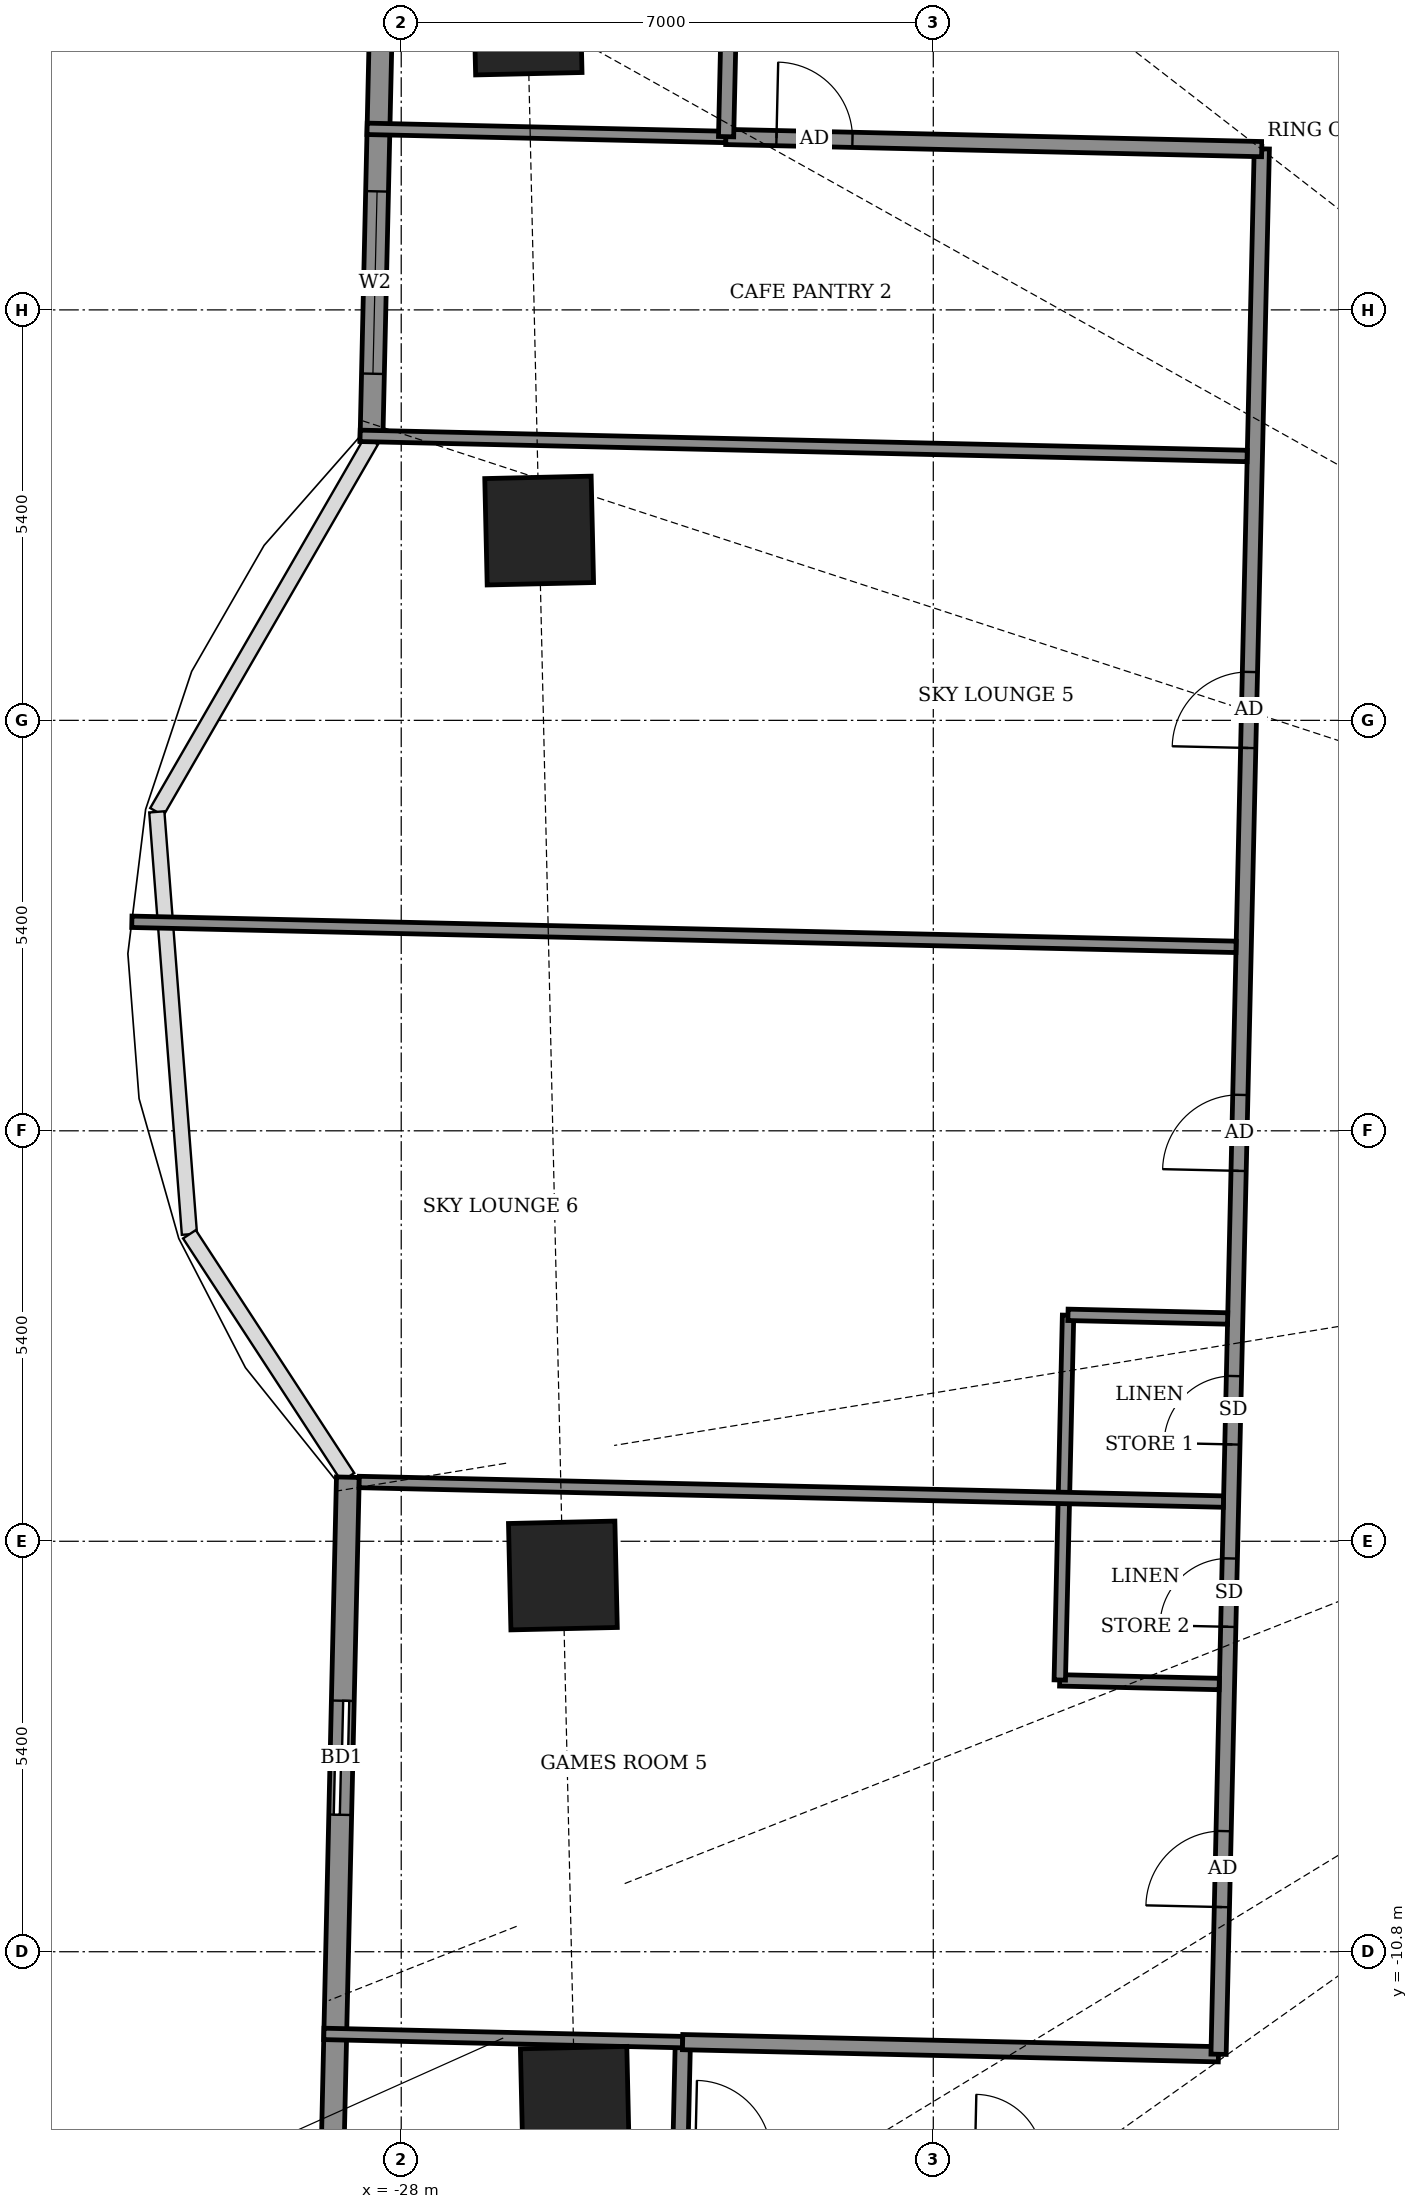
"""IFC4 building model, lengths in metres.
Left out: names, types, materials, properties, quantities, classifications, styles, units other than length and angle.
Written with IfcOpenShell. Run it as: python <this file> out.ifc"""

import sys

from ifc_helpers import new_model, si_unit, direction, frame, frame_2d, origin, origin_2d, place, context, subcontext, project, spatial, rectangle, extrude, element, fill, save


model = new_model("IFC4")
c1 = context("Model", 3, precision=1e-05, world=origin(), true_north=direction((0.0, 1.0)))
c2 = subcontext(c1, "Body", "Model", "MODEL_VIEW")
j1 = project(units=[si_unit("LENGTHUNIT", "METRE"), si_unit("PLANEANGLEUNIT", "RADIAN")], contexts=[c1])
p1 = place(None, origin())
s1 = spatial("IfcSite", under=j1, at=p1, CompositionType="ELEMENT")
p2 = place(p1, origin())
s2 = spatial("IfcBuilding", under=s1, at=p2, CompositionType="ELEMENT")
p3 = place(p2, frame((0.0, 0.0, 97.3)))
s3 = spatial("IfcBuildingStorey", under=s2, at=p3, CompositionType="ELEMENT", Elevation=97.3)
for number, where, z_axis, x_axis in (
    (1, (-25.873, -5.85, -0.55), (0.0, 0.0, 1.0), (0.023, -1.0, 0.0)),
    (2, (-25.716, -12.761, -0.55), (0.0, 0.0, 1.0), (0.023, -1.0, 0.0)),
    (3, (-26.337, 14.607, -0.55), (0.0, 0.0, 1.0), (0.023, -1.0, 0.0)),
    (4, (-26.185, 7.897, -0.55), (0.0, 0.0, 1.0), (0.023, -1.0, 0.0)),
):
    element("IfcColumn", number, at=place(p3, frame(where, z_axis=z_axis, x_axis=x_axis)), inside=s3, PredefinedType="COLUMN", context=c2, shape_type="SweptSolid", body=[
        extrude(rectangle(XDim=1.4, YDim=1.4, at=origin_2d()), origin(), (0.0, 0.0, 1.0), 4.6),
    ])
p4 = place(p3, frame((-28.106, 21.707, 0.0), z_axis=(0.0, 0.0, 1.0), x_axis=(-0.022654663697, -0.999743350172, 0.0)))
e5 = element("IfcWall", 5, at=p4, inside=s3, PredefinedType="SOLIDWALL", context=c2, shape_type="SweptSolid", body=[
    extrude(rectangle(XDim=12.63, YDim=0.3, at=frame_2d((6.315, 0.0))), origin(), (0.0, 0.0, 1.0), 2.55),
])
p5 = place(p4, frame((3.287, 0.0, 0.0)))
e6 = element("IfcOpeningElement", 6, at=p5, cuts=e5, PredefinedType="OPENING", context=c2, shape_type="SweptSolid", body=[
    extrude(rectangle(XDim=1.5, YDim=2.4, at=frame_2d((0.75, 1.2))), frame((0.0, 0.16, 0.0), z_axis=(0.0, -1.0, 0.0), x_axis=(1.0, 0.0, 0.0)), (0.0, 0.0, 1.0), 0.32),
])
p6 = place(p4, frame((9.35, 0.0, 0.9)))
e7 = element("IfcOpeningElement", 7, at=p6, cuts=e5, PredefinedType="OPENING", context=c2, shape_type="SweptSolid", body=[
    extrude(rectangle(XDim=2.4, YDim=1.5, at=frame_2d((1.2, 0.75))), frame((0.0, 0.16, 0.0), z_axis=(0.0, -1.0, 0.0), x_axis=(1.0, 0.0, 0.0)), (0.0, 0.0, 1.0), 0.32),
])
p7 = place(p3, frame((-28.702, -4.557, 0.0), z_axis=(0.0, 0.0, 1.0), x_axis=(-0.022653729471, -0.999743371341, 0.0)))
e8 = element("IfcWall", 8, at=p7, inside=s3, PredefinedType="SOLIDWALL", context=c2, shape_type="SweptSolid", body=[
    extrude(rectangle(XDim=13.03, YDim=0.3, at=frame_2d((6.515, 0.0))), origin(), (0.0, 0.0, 1.0), 2.85),
])
p8 = place(p7, frame((2.942, 0.0, 0.0)))
e9 = element("IfcOpeningElement", 9, at=p8, cuts=e8, PredefinedType="OPENING", context=c2, shape_type="SweptSolid", body=[
    extrude(rectangle(XDim=1.5, YDim=2.4, at=frame_2d((0.75, 1.2))), frame((0.0, 0.16, 0.0), z_axis=(0.0, -1.0, 0.0), x_axis=(1.0, 0.0, 0.0)), (0.0, 0.0, 1.0), 0.32),
])
p9 = place(p7, frame((9.054, 0.0, 0.9)))
e10 = element("IfcOpeningElement", 10, at=p9, cuts=e8, PredefinedType="OPENING", context=c2, shape_type="SweptSolid", body=[
    extrude(rectangle(XDim=2.4, YDim=1.5, at=frame_2d((1.2, 0.75))), frame((0.0, 0.16, 0.0), z_axis=(0.0, -1.0, 0.0), x_axis=(1.0, 0.0, 0.0)), (0.0, 0.0, 1.0), 0.32),
])
p10 = place(p3, frame((-31.765, -17.67, 0.0), z_axis=(0.0, 0.0, 1.0), x_axis=(0.022666865795, 0.999743073592, 0.0)))
e11 = element("IfcWall", 11, at=p10, inside=s3, PredefinedType="USERDEFINED", context=c2, shape_type="SweptSolid", body=[
    extrude(rectangle(XDim=5.999, YDim=0.55, at=frame_2d((3.0, 0.0))), origin(), (0.0, 0.0, 1.0), 0.8),
])
p11 = place(p3, frame((-24.329, -13.488, 0.0), z_axis=(0.0, 0.0, 1.0), x_axis=(0.02279537805, 0.999740151609, 0.0)))
e12 = element("IfcWall", 12, at=p11, inside=s3, PredefinedType="PARTITIONING", context=c2, shape_type="SweptSolid", body=[
    extrude(rectangle(XDim=1.5, YDim=0.2, at=frame_2d((0.75, 0.0))), origin(), (0.0, 0.0, 1.0), 4.05),
])
p12 = place(p3, frame((-29.018, -11.881, 0.0), z_axis=(0.0, 0.0, 1.0), x_axis=(0.999738756298, -0.022856490471, 0.0)))
e13 = element("IfcWall", 13, at=p12, inside=s3, PredefinedType="PARTITIONING", context=c2, shape_type="SweptSolid", body=[
    extrude(rectangle(XDim=4.721, YDim=0.15, at=frame_2d((2.361, 0.0))), origin(), (0.0, 0.0, 1.0), 2.55),
])
p13 = place(p3, frame((-24.298, -11.989, 0.0), z_axis=(0.0, 0.0, 1.0), x_axis=(0.999742853322, -0.022676578901, 0.0)))
e14 = element("IfcWall", 14, at=p13, inside=s3, PredefinedType="PARTITIONING", context=c2, shape_type="SweptSolid", body=[
    extrude(rectangle(XDim=7.052, YDim=0.2, at=frame_2d((3.526, 0.0))), origin(), (0.0, 0.0, 1.0), 2.75),
])
p14 = place(p3, frame((-17.247, -12.149, 0.0), z_axis=(0.0, 0.0, 1.0), x_axis=(0.022696191528, 0.999742408268, 0.0)))
e15 = element("IfcWall", 15, at=p14, inside=s3, PredefinedType="PARTITIONING", context=c2, shape_type="SweptSolid", body=[
    extrude(rectangle(XDim=25.074, YDim=0.2, at=frame_2d((12.537, 0.0))), origin(), (0.0, 0.0, 1.0), 2.55),
])
p15 = place(p14, frame((17.19, 0.0, 0.0)))
e16 = element("IfcOpeningElement", 16, at=p15, cuts=e15, PredefinedType="OPENING", context=c2, shape_type="SweptSolid", body=[
    extrude(rectangle(XDim=1.0, YDim=2.1, at=frame_2d((0.5, 1.05))), frame((0.0, 0.11, 0.0), z_axis=(0.0, -1.0, 0.0), x_axis=(1.0, 0.0, 0.0)), (0.0, 0.0, 1.0), 0.22),
])
p16 = place(p14, frame((11.625, 0.0, 0.0)))
e17 = element("IfcOpeningElement", 17, at=p16, cuts=e15, PredefinedType="OPENING", context=c2, shape_type="SweptSolid", body=[
    extrude(rectangle(XDim=1.0, YDim=2.1, at=frame_2d((0.5, 1.05))), frame((0.0, 0.11, 0.0), z_axis=(0.0, -1.0, 0.0), x_axis=(1.0, 0.0, 0.0)), (0.0, 0.0, 1.0), 0.22),
])
p17 = place(p14, frame((8.025, 0.0, 0.0)))
e18 = element("IfcOpeningElement", 18, at=p17, cuts=e15, PredefinedType="OPENING", context=c2, shape_type="SweptSolid", body=[
    extrude(rectangle(XDim=0.9, YDim=2.1, at=frame_2d((0.45, 1.05))), frame((0.0, 0.11, 0.0), z_axis=(0.0, -1.0, 0.0), x_axis=(1.0, 0.0, 0.0)), (0.0, 0.0, 1.0), 0.22),
])
p18 = place(p14, frame((1.937, 0.0, 0.0)))
e19 = element("IfcOpeningElement", 19, at=p18, cuts=e15, PredefinedType="OPENING", context=c2, shape_type="SweptSolid", body=[
    extrude(rectangle(XDim=1.0, YDim=2.1, at=frame_2d((0.5, 1.05))), frame((0.0, 0.11, 0.0), z_axis=(0.0, -1.0, 0.0), x_axis=(1.0, 0.0, 0.0)), (0.0, 0.0, 1.0), 0.22),
])
p19 = place(p14, frame((5.625, 0.0, 0.0)))
e20 = element("IfcOpeningElement", 20, at=p19, cuts=e15, PredefinedType="OPENING", context=c2, shape_type="SweptSolid", body=[
    extrude(rectangle(XDim=0.9, YDim=2.1, at=frame_2d((0.45, 1.05))), frame((0.0, 0.11, 0.0), z_axis=(0.0, -1.0, 0.0), x_axis=(1.0, 0.0, 0.0)), (0.0, 0.0, 1.0), 0.22),
])
p20 = place(p3, frame((-19.337, -7.23, 0.0), z_axis=(0.0, 0.0, 1.0), x_axis=(0.999737555419, -0.022908956429, 0.0)))
e21 = element("IfcWall", 21, at=p20, inside=s3, PredefinedType="PARTITIONING", context=c2, shape_type="SweptSolid", body=[
    extrude(rectangle(XDim=2.099, YDim=0.15, at=frame_2d((1.05, 0.0))), origin(), (0.0, 0.0, 1.0), 2.85),
])
p21 = place(p3, frame((-19.336, -7.225, 0.0), z_axis=(0.0, 0.0, 1.0), x_axis=(0.022683280499, 0.999742701292, 0.0)))
e22 = element("IfcWall", 22, at=p21, inside=s3, PredefinedType="PARTITIONING", context=c2, shape_type="SweptSolid", body=[
    extrude(rectangle(XDim=4.8, YDim=0.15, at=frame_2d((2.4, 0.0))), origin(), (0.0, 0.0, 1.0), 2.85),
])
p22 = place(p3, frame((-28.553, -4.62, 0.0), z_axis=(0.0, 0.0, 1.0), x_axis=(0.999743020026, -0.022669228257, 0.0)))
e23 = element("IfcWall", 23, at=p22, inside=s3, PredefinedType="PARTITIONING", context=c2, shape_type="SweptSolid", body=[
    extrude(rectangle(XDim=11.373, YDim=0.15, at=frame_2d((5.687, 0.0))), origin(), (0.0, 0.0, 1.0), 2.55),
])
p23 = place(p3, frame((-19.228, -2.421, 0.0), z_axis=(0.0, 0.0, 1.0), x_axis=(0.999737860308, -0.022895647347, 0.0)))
e24 = element("IfcWall", 24, at=p23, inside=s3, PredefinedType="PARTITIONING", context=c2, shape_type="SweptSolid", body=[
    extrude(rectangle(XDim=2.101, YDim=0.15, at=frame_2d((1.05, 0.0))), origin(), (0.0, 0.0, 1.0), 2.85),
])
p24 = place(p3, frame((-31.544, 2.75, 0.0), z_axis=(0.0, 0.0, 1.0), x_axis=(0.999741956969, -0.022716062079, 0.0)))
e25 = element("IfcWall", 25, at=p24, inside=s3, PredefinedType="PARTITIONING", context=c2, shape_type="SweptSolid", body=[
    extrude(rectangle(XDim=14.531, YDim=0.15, at=frame_2d((7.265, 0.0))), origin(), (0.0, 0.0, 1.0), 0.93),
])
p25 = place(p3, frame((-28.541, 9.143, 0.0), z_axis=(0.0, 0.0, 1.0), x_axis=(0.999742008279, -0.022713803786, 0.0)))
e26 = element("IfcWall", 26, at=p25, inside=s3, PredefinedType="PARTITIONING", context=c2, shape_type="SweptSolid", body=[
    extrude(rectangle(XDim=11.673, YDim=0.15, at=frame_2d((5.836, 0.0))), origin(), (0.0, 0.0, 1.0), 2.55),
])
p26 = place(p3, frame((-28.449, 13.182, 0.0), z_axis=(0.0, 0.0, 1.0), x_axis=(0.999743885417, -0.022631031155, 0.0)))
e27 = element("IfcWall", 27, at=p26, inside=s3, PredefinedType="PARTITIONING", context=c2, shape_type="SweptSolid", body=[
    extrude(rectangle(XDim=4.725, YDim=0.15, at=frame_2d((2.363, 0.0))), origin(), (0.0, 0.0, 1.0), 2.55),
])
p27 = place(p3, frame((-23.729, 13.075, 0.0), z_axis=(0.0, 0.0, 1.0), x_axis=(0.999742853322, -0.022676578901, 0.0)))
e28 = element("IfcWall", 28, at=p27, inside=s3, PredefinedType="PARTITIONING", context=c2, shape_type="SweptSolid", body=[
    extrude(rectangle(XDim=7.052, YDim=0.2, at=frame_2d((3.526, 0.0))), origin(), (0.0, 0.0, 1.0), 2.55),
])
p28 = place(p27, frame((0.666, 0.0, 0.0)))
e29 = element("IfcOpeningElement", 29, at=p28, cuts=e28, PredefinedType="OPENING", context=c2, shape_type="SweptSolid", body=[
    extrude(rectangle(XDim=1.0, YDim=2.1, at=frame_2d((0.5, 1.05))), frame((0.0, 0.11, 0.0), z_axis=(0.0, -1.0, 0.0), x_axis=(1.0, 0.0, 0.0)), (0.0, 0.0, 1.0), 0.22),
])
p29 = place(p3, frame((-23.726, 13.079, 0.0), z_axis=(0.0, 0.0, 1.0), x_axis=(0.022780545013, 0.999740489712, 0.0)))
e30 = element("IfcWall", 30, at=p29, inside=s3, PredefinedType="PARTITIONING", context=c2, shape_type="SweptSolid", body=[
    extrude(rectangle(XDim=1.5, YDim=0.2, at=frame_2d((0.75, 0.0))), origin(), (0.0, 0.0, 1.0), 2.65),
])
p30 = place(p3, frame((-23.695, 14.575, 0.0), z_axis=(0.0, 0.0, 1.0), x_axis=(0.999742555853, -0.022689689667, 0.0)))
e31 = element("IfcWall", 31, at=p30, inside=s3, PredefinedType="PARTITIONING", context=c2, shape_type="SweptSolid", body=[
    extrude(rectangle(XDim=48.086, YDim=0.2, at=frame_2d((24.043, 0.0))), origin(), (0.0, 0.0, 1.0), 2.1),
])
p31 = place(p30, frame((42.749, 0.0, 0.0)))
e32 = element("IfcOpeningElement", 32, at=p31, cuts=e31, PredefinedType="OPENING", context=c2, shape_type="SweptSolid", body=[
    extrude(rectangle(XDim=1.0, YDim=2.1, at=frame_2d((0.5, 1.05))), frame((0.0, 0.11, 0.0), z_axis=(0.0, -1.0, 0.0), x_axis=(1.0, 0.0, 0.0)), (0.0, 0.0, 1.0), 0.22),
])
p32 = place(p30, frame((34.254, 0.0, 0.0)))
e33 = element("IfcOpeningElement", 33, at=p32, cuts=e31, PredefinedType="OPENING", context=c2, shape_type="SweptSolid", body=[
    extrude(rectangle(XDim=1.0, YDim=2.1, at=frame_2d((0.5, 1.05))), frame((0.0, 0.11, 0.0), z_axis=(0.0, -1.0, 0.0), x_axis=(1.0, 0.0, 0.0)), (0.0, 0.0, 1.0), 0.22),
])
p33 = place(p30, frame((30.029, 0.0, 0.0)))
e34 = element("IfcOpeningElement", 34, at=p33, cuts=e31, PredefinedType="OPENING", context=c2, shape_type="SweptSolid", body=[
    extrude(rectangle(XDim=0.9, YDim=2.1, at=frame_2d((0.45, 1.05))), frame((0.0, 0.11, 0.0), z_axis=(0.0, -1.0, 0.0), x_axis=(1.0, 0.0, 0.0)), (0.0, 0.0, 1.0), 0.22),
])
p34 = place(p30, frame((25.129, 0.0, 0.0)))
e35 = element("IfcOpeningElement", 35, at=p34, cuts=e31, PredefinedType="OPENING", context=c2, shape_type="SweptSolid", body=[
    extrude(rectangle(XDim=0.9, YDim=2.1, at=frame_2d((0.45, 1.05))), frame((0.0, 0.11, 0.0), z_axis=(0.0, -1.0, 0.0), x_axis=(1.0, 0.0, 0.0)), (0.0, 0.0, 1.0), 0.22),
])
p35 = place(p30, frame((22.529, 0.0, 0.0)))
e36 = element("IfcOpeningElement", 36, at=p35, cuts=e31, PredefinedType="OPENING", context=c2, shape_type="SweptSolid", body=[
    extrude(rectangle(XDim=0.9, YDim=2.1, at=frame_2d((0.45, 1.05))), frame((0.0, 0.11, 0.0), z_axis=(0.0, -1.0, 0.0), x_axis=(1.0, 0.0, 0.0)), (0.0, 0.0, 1.0), 0.22),
])
p36 = place(p30, frame((17.154, 0.0, 0.0)))
e37 = element("IfcOpeningElement", 37, at=p36, cuts=e31, PredefinedType="OPENING", context=c2, shape_type="SweptSolid", body=[
    extrude(rectangle(XDim=1.0, YDim=2.1, at=frame_2d((0.5, 1.05))), frame((0.0, 0.11, 0.0), z_axis=(0.0, -1.0, 0.0), x_axis=(1.0, 0.0, 0.0)), (0.0, 0.0, 1.0), 0.22),
])
p37 = place(p30, frame((11.279, 0.0, 0.0)))
e38 = element("IfcOpeningElement", 38, at=p37, cuts=e31, PredefinedType="OPENING", context=c2, shape_type="SweptSolid", body=[
    extrude(rectangle(XDim=1.0, YDim=2.1, at=frame_2d((0.5, 1.05))), frame((0.0, 0.11, 0.0), z_axis=(0.0, -1.0, 0.0), x_axis=(1.0, 0.0, 0.0)), (0.0, 0.0, 1.0), 0.22),
])
p38 = place(p30, frame((1.321, 0.0, 0.0)))
e39 = element("IfcOpeningElement", 39, at=p38, cuts=e31, PredefinedType="OPENING", context=c2, shape_type="SweptSolid", body=[
    extrude(rectangle(XDim=1.0, YDim=2.1, at=frame_2d((0.5, 1.05))), frame((0.0, 0.11, 0.0), z_axis=(0.0, -1.0, 0.0), x_axis=(1.0, 0.0, 0.0)), (0.0, 0.0, 1.0), 0.22),
])
p39 = place(p6, origin())
e40 = element("IfcWindow", 40, at=p39, inside=s3, PartitioningType="DOUBLE_PANEL_VERTICAL", PredefinedType="WINDOW", context=c2, shape_type="SweptSolid", body=[
    extrude(rectangle(XDim=2.4, YDim=1.5, at=frame_2d((1.2, 0.75))), frame((0.0, 0.03, 0.0), z_axis=(0.0, -1.0, 0.0), x_axis=(1.0, 0.0, 0.0)), (0.0, 0.0, 1.0), 0.06),
])
fill(e7, e40)
p40 = place(p8, origin())
e41 = element("IfcDoor", 41, at=p40, inside=s3, OperationType="SLIDING_TO_LEFT", PredefinedType="DOOR", context=c2, shape_type="SweptSolid", body=[
    extrude(rectangle(XDim=1.5, YDim=2.4, at=frame_2d((0.75, 1.2))), frame((0.0, 0.025, 0.0), z_axis=(0.0, -1.0, 0.0), x_axis=(1.0, 0.0, 0.0)), (0.0, 0.0, 1.0), 0.05),
])
fill(e9, e41)
p41 = place(p28, origin())
e42 = element("IfcDoor", 42, at=p41, inside=s3, OperationType="SINGLE_SWING_RIGHT", PredefinedType="DOOR", context=c2, shape_type="SweptSolid", body=[
    extrude(rectangle(XDim=1.0, YDim=2.1, at=frame_2d((0.5, 1.05))), frame((0.0, 0.025, 0.0), z_axis=(0.0, -1.0, 0.0), x_axis=(1.0, 0.0, 0.0)), (0.0, 0.0, 1.0), 0.05),
])
fill(e29, e42)
p42 = place(p15, origin())
e43 = element("IfcDoor", 43, at=p42, inside=s3, OperationType="SINGLE_SWING_LEFT", PredefinedType="DOOR", context=c2, shape_type="SweptSolid", body=[
    extrude(rectangle(XDim=1.0, YDim=2.1, at=frame_2d((0.5, 1.05))), frame((0.0, 0.025, 0.0), z_axis=(0.0, -1.0, 0.0), x_axis=(1.0, 0.0, 0.0)), (0.0, 0.0, 1.0), 0.05),
])
fill(e16, e43)
p43 = place(p16, origin())
e44 = element("IfcDoor", 44, at=p43, inside=s3, OperationType="SINGLE_SWING_RIGHT", PredefinedType="DOOR", context=c2, shape_type="SweptSolid", body=[
    extrude(rectangle(XDim=1.0, YDim=2.1, at=frame_2d((0.5, 1.05))), frame((0.0, 0.025, 0.0), z_axis=(0.0, -1.0, 0.0), x_axis=(1.0, 0.0, 0.0)), (0.0, 0.0, 1.0), 0.05),
])
fill(e17, e44)
p44 = place(p17, origin())
e45 = element("IfcDoor", 45, at=p44, inside=s3, OperationType="SINGLE_SWING_LEFT", PredefinedType="DOOR", context=c2, shape_type="SweptSolid", body=[
    extrude(rectangle(XDim=0.9, YDim=2.1, at=frame_2d((0.45, 1.05))), frame((0.0, 0.025, 0.0), z_axis=(0.0, -1.0, 0.0), x_axis=(1.0, 0.0, 0.0)), (0.0, 0.0, 1.0), 0.05),
])
fill(e18, e45)
p45 = place(p18, origin())
e46 = element("IfcDoor", 46, at=p45, inside=s3, OperationType="SINGLE_SWING_LEFT", PredefinedType="DOOR", context=c2, shape_type="SweptSolid", body=[
    extrude(rectangle(XDim=1.0, YDim=2.1, at=frame_2d((0.5, 1.05))), frame((0.0, 0.025, 0.0), z_axis=(0.0, -1.0, 0.0), x_axis=(1.0, 0.0, 0.0)), (0.0, 0.0, 1.0), 0.05),
])
fill(e19, e46)
p46 = place(p19, origin())
e47 = element("IfcDoor", 47, at=p46, inside=s3, OperationType="SINGLE_SWING_RIGHT", PredefinedType="DOOR", context=c2, shape_type="SweptSolid", body=[
    extrude(rectangle(XDim=0.9, YDim=2.1, at=frame_2d((0.45, 1.05))), frame((0.0, 0.025, 0.0), z_axis=(0.0, -1.0, 0.0), x_axis=(1.0, 0.0, 0.0)), (0.0, 0.0, 1.0), 0.05),
])
fill(e20, e47)
save(model, sys.argv[1])
